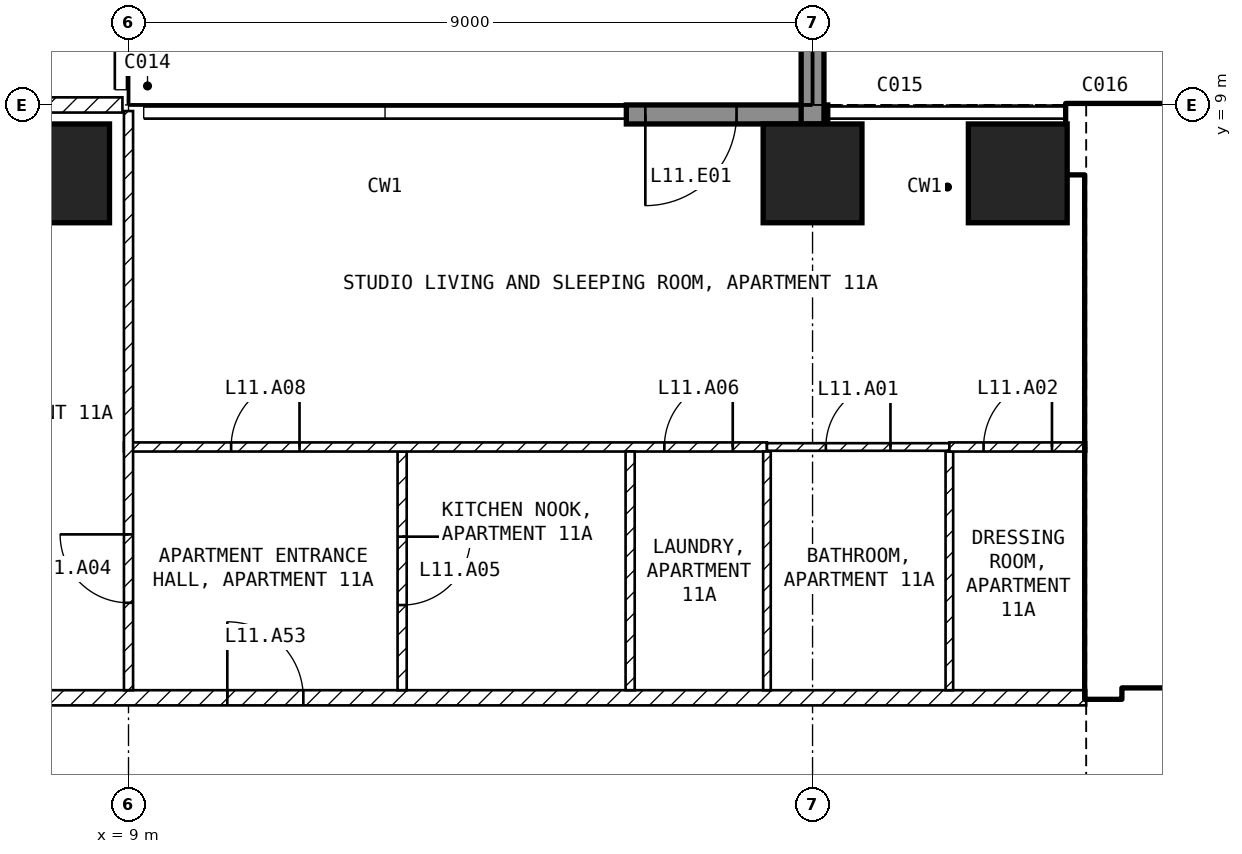
"""IFC4 building model, lengths in metres.
Left out: names, types, materials, properties, quantities, classifications, styles, units other than length and angle.
Written with IfcOpenShell. Run it as: python <this file> out.ifc"""

import sys

from ifc_helpers import new_model, si_unit, direction, frame, frame_2d, origin, origin_2d, place, context, subcontext, project, spatial, rectangle, extrude, element, fill, save


model = new_model("IFC4")
c1 = context("Model", 3, precision=1e-05, world=origin(), true_north=direction((0.0, 1.0)))
c2 = subcontext(c1, "Body", "Model", "MODEL_VIEW")
j1 = project(units=[si_unit("LENGTHUNIT", "METRE"), si_unit("PLANEANGLEUNIT", "RADIAN")], contexts=[c1])
p1 = place(None, origin())
s1 = spatial("IfcSite", under=j1, at=p1, CompositionType="ELEMENT")
p2 = place(p1, origin())
s2 = spatial("IfcBuilding", under=s1, at=p2, CompositionType="ELEMENT")
p3 = place(p2, frame((0.0, 0.0, 57.5)))
s3 = spatial("IfcBuildingStorey", under=s2, at=p3, CompositionType="ELEMENT", Elevation=57.5)
for number, where, z_axis, x_axis in (
    (1, (8.1, 8.1, -0.25), (0.0, 0.0, 1.0), (1.0, 0.0, 0.0)),
    (2, (18.0, 8.1, -0.25), (0.0, 0.0, 1.0), (1.0, 0.0, 0.0)),
    (3, (20.7, 8.1, -0.25), (0.0, 0.0, 1.0), (1.0, 0.0, 0.0)),
):
    element("IfcColumn", number, at=place(p3, frame(where, z_axis=z_axis, x_axis=x_axis)), inside=s3, PredefinedType="COLUMN", context=c2, shape_type="SweptSolid", body=[
        extrude(rectangle(XDim=1.3, YDim=1.3, at=origin_2d()), origin(), (0.0, 0.0, 1.0), 3.5),
    ])
p4 = place(p3, frame((18.2, 8.875, 0.0), z_axis=(0.0, 0.0, 1.0), x_axis=(-1.0, 0.0, 0.0)))
e4 = element("IfcWall", 4, at=p4, inside=s3, PredefinedType="SOLIDWALL", context=c2, shape_type="SweptSolid", body=[
    extrude(rectangle(XDim=2.65, YDim=0.25, at=frame_2d((1.325, 0.0))), origin(), (0.0, 0.0, 1.0), 3.25),
])
p5 = place(p4, frame((1.2, 0.0, 0.0)))
e5 = element("IfcOpeningElement", 5, at=p5, cuts=e4, PredefinedType="OPENING", context=c2, shape_type="SweptSolid", body=[
    extrude(rectangle(XDim=1.2, YDim=2.4, at=frame_2d((0.6, 1.2))), frame((0.0, 0.135, 0.0), z_axis=(0.0, -1.0, 0.0), x_axis=(1.0, 0.0, 0.0)), (0.0, 0.0, 1.0), 0.27),
])
p6 = place(p3, frame((18.0, 8.75, 0.0), z_axis=(0.0, 0.0, 1.0), x_axis=(0.0, 1.0, 0.0)))
e6 = element("IfcWall", 6, at=p6, inside=s3, PredefinedType="SOLIDWALL", context=c2, shape_type="SweptSolid", body=[
    extrude(rectangle(XDim=2.95, YDim=0.3, at=frame_2d((1.475, 0.0))), origin(), (0.0, 0.0, 1.0), 3.25),
])
p7 = place(p3, frame((21.35, 8.55, 0.0), z_axis=(0.0, 0.0, 1.0), x_axis=(1.0, 0.0, 0.0)))
e7 = element("IfcWall", 7, at=p7, inside=s3, PredefinedType="SHEAR", context=c2, shape_type="SweptSolid", body=[
    extrude(rectangle(XDim=10.15, YDim=0.9, at=frame_2d((5.075, 0.0))), origin(), (0.0, 0.0, 1.0), 3.25),
])
p8 = place(p3, frame((21.825, 1.2, 0.0), z_axis=(0.0, 0.0, 1.0), x_axis=(0.0, 1.0, 0.0)))
e8 = element("IfcWall", 8, at=p8, inside=s3, PredefinedType="SHEAR", context=c2, shape_type="SweptSolid", body=[
    extrude(rectangle(XDim=6.9, YDim=0.45, at=frame_2d((3.45, 0.0))), origin(), (0.0, 0.0, 1.0), 3.25),
])
p9 = place(p3, frame((22.05, 1.45, 0.0), z_axis=(0.0, 0.0, 1.0), x_axis=(1.0, 0.0, 0.0)))
e9 = element("IfcWall", 9, at=p9, inside=s3, PredefinedType="SOLIDWALL", context=c2, shape_type="SweptSolid", body=[
    extrude(rectangle(XDim=13.05, YDim=0.2, at=frame_2d((6.525, 0.0))), origin(), (0.0, 0.0, 1.0), 3.25),
])
p10 = place(p9, frame((0.75, 0.0, 0.0)))
e10 = element("IfcOpeningElement", 10, at=p10, cuts=e9, PredefinedType="OPENING", context=c2, shape_type="SweptSolid", body=[
    extrude(rectangle(XDim=1.0, YDim=2.1, at=frame_2d((0.5, 1.05))), frame((0.0, 0.11, 0.0), z_axis=(0.0, -1.0, 0.0), x_axis=(1.0, 0.0, 0.0)), (0.0, 0.0, 1.0), 0.22),
])
p11 = place(p9, frame((3.25, 0.0, 0.0)))
e11 = element("IfcOpeningElement", 11, at=p11, cuts=e9, PredefinedType="OPENING", context=c2, shape_type="SweptSolid", body=[
    extrude(rectangle(XDim=1.0, YDim=2.1, at=frame_2d((0.5, 1.05))), frame((0.0, 0.11, 0.0), z_axis=(0.0, -1.0, 0.0), x_axis=(1.0, 0.0, 0.0)), (0.0, 0.0, 1.0), 0.22),
])
p12 = place(p3, frame((22.05, 5.15, 0.0), z_axis=(0.0, 0.0, 1.0), x_axis=(1.0, 0.0, 0.0)))
e12 = element("IfcWall", 12, at=p12, inside=s3, PredefinedType="SOLIDWALL", context=c2, shape_type="SweptSolid", body=[
    extrude(rectangle(XDim=6.3, YDim=0.2, at=frame_2d((3.15, 0.0))), origin(), (0.0, 0.0, 1.0), 3.25),
])
p13 = place(p12, frame((0.2, 0.0, 0.0)))
e13 = element("IfcOpeningElement", 13, at=p13, cuts=e12, PredefinedType="OPENING", context=c2, shape_type="SweptSolid", body=[
    extrude(rectangle(XDim=1.0, YDim=2.1, at=frame_2d((0.5, 1.05))), frame((0.0, 0.11, 0.0), z_axis=(0.0, -1.0, 0.0), x_axis=(1.0, 0.0, 0.0)), (0.0, 0.0, 1.0), 0.22),
])
p14 = place(p3, frame((1.1, 1.2, 0.0), z_axis=(0.0, 0.0, 1.0), x_axis=(1.0, 0.0, 0.0)))
e14 = element("IfcWall", 14, at=p14, inside=s3, PredefinedType="PARTITIONING", context=c2, shape_type="SweptSolid", body=[
    extrude(rectangle(XDim=20.5, YDim=0.2, at=frame_2d((10.25, 0.0))), origin(), (0.0, 0.0, 1.0), 3.25),
])
p15 = place(p14, frame((9.2, 0.0, 0.0)))
e15 = element("IfcOpeningElement", 15, at=p15, cuts=e14, PredefinedType="OPENING", context=c2, shape_type="SweptSolid", body=[
    extrude(rectangle(XDim=1.0, YDim=2.1, at=frame_2d((0.5, 1.05))), frame((0.0, 0.11, 0.0), z_axis=(0.0, -1.0, 0.0), x_axis=(1.0, 0.0, 0.0)), (0.0, 0.0, 1.0), 0.22),
])
p16 = place(p3, frame((-8.92, 9.0, 0.0), z_axis=(0.0, 0.0, 1.0), x_axis=(1.0, 0.0, 0.0)))
e16 = element("IfcWall", 16, at=p16, inside=s3, PredefinedType="PARTITIONING", context=c2, shape_type="SweptSolid", body=[
    extrude(rectangle(XDim=17.84, YDim=0.2, at=frame_2d((8.92, 0.0))), origin(), (0.0, 0.0, 1.0), 3.25),
])
p17 = place(p16, frame((8.42, 0.0, 0.0)))
e17 = element("IfcOpeningElement", 17, at=p17, cuts=e16, PredefinedType="OPENING", context=c2, shape_type="SweptSolid", body=[
    extrude(rectangle(XDim=1.0, YDim=2.1, at=frame_2d((0.5, 1.05))), frame((0.0, 0.11, 0.0), z_axis=(0.0, -1.0, 0.0), x_axis=(1.0, 0.0, 0.0)), (0.0, 0.0, 1.0), 0.22),
])
p18 = place(p3, frame((12.6, 4.44, 0.0), z_axis=(0.0, 0.0, 1.0), x_axis=(0.0, -1.0, 0.0)))
e18 = element("IfcWall", 18, at=p18, inside=s3, PredefinedType="PARTITIONING", context=c2, shape_type="SweptSolid", body=[
    extrude(rectangle(XDim=3.14, YDim=0.12, at=frame_2d((1.57, 0.0))), origin(), (0.0, 0.0, 1.0), 3.25),
])
p19 = place(p18, frame((1.12, 0.0, 0.0)))
e19 = element("IfcOpeningElement", 19, at=p19, cuts=e18, PredefinedType="OPENING", context=c2, shape_type="SweptSolid", body=[
    extrude(rectangle(XDim=0.9, YDim=2.1, at=frame_2d((0.45, 1.05))), frame((0.0, 0.07, 0.0), z_axis=(0.0, -1.0, 0.0), x_axis=(1.0, 0.0, 0.0)), (0.0, 0.0, 1.0), 0.14),
])
p20 = place(p3, frame((8.94, 4.5, 0.0), z_axis=(0.0, 0.0, 1.0), x_axis=(1.0, 0.0, 0.0)))
e20 = element("IfcWall", 20, at=p20, inside=s3, PredefinedType="PARTITIONING", context=c2, shape_type="SweptSolid", body=[
    extrude(rectangle(XDim=8.46, YDim=0.12, at=frame_2d((4.23, 0.0))), origin(), (0.0, 0.0, 1.0), 3.25),
])
p21 = place(p20, frame((7.11, 0.0, 0.0)))
e21 = element("IfcOpeningElement", 21, at=p21, cuts=e20, PredefinedType="OPENING", context=c2, shape_type="SweptSolid", body=[
    extrude(rectangle(XDim=0.9, YDim=2.1, at=frame_2d((0.45, 1.05))), frame((0.0, 0.07, 0.0), z_axis=(0.0, -1.0, 0.0), x_axis=(1.0, 0.0, 0.0)), (0.0, 0.0, 1.0), 0.14),
])
p22 = place(p20, frame((1.41, 0.0, 0.0)))
e22 = element("IfcOpeningElement", 22, at=p22, cuts=e20, PredefinedType="OPENING", context=c2, shape_type="SweptSolid", body=[
    extrude(rectangle(XDim=0.9, YDim=2.1, at=frame_2d((0.45, 1.05))), frame((0.0, 0.07, 0.0), z_axis=(0.0, -1.0, 0.0), x_axis=(1.0, 0.0, 0.0)), (0.0, 0.0, 1.0), 0.14),
])
p23 = place(p3, frame((9.0, 1.3, 0.0), z_axis=(0.0, 0.0, 1.0), x_axis=(0.0, 1.0, 0.0)))
e23 = element("IfcWall", 23, at=p23, inside=s3, PredefinedType="PARTITIONING", context=c2, shape_type="SweptSolid", body=[
    extrude(rectangle(XDim=7.62, YDim=0.12, at=frame_2d((3.81, 0.0))), origin(), (0.0, 0.0, 1.0), 3.25),
])
p24 = place(p23, frame((1.15, 0.0, 0.0)))
e24 = element("IfcOpeningElement", 24, at=p24, cuts=e23, PredefinedType="OPENING", context=c2, shape_type="SweptSolid", body=[
    extrude(rectangle(XDim=0.9, YDim=2.1, at=frame_2d((0.45, 1.05))), frame((0.0, 0.07, 0.0), z_axis=(0.0, -1.0, 0.0), x_axis=(1.0, 0.0, 0.0)), (0.0, 0.0, 1.0), 0.14),
])
p25 = place(p3, frame((15.6, 4.44, 0.0), z_axis=(0.0, 0.0, 1.0), x_axis=(0.0, -1.0, 0.0)))
e25 = element("IfcWall", 25, at=p25, inside=s3, PredefinedType="PARTITIONING", context=c2, shape_type="SweptSolid", body=[
    extrude(rectangle(XDim=3.14, YDim=0.12, at=frame_2d((1.57, 0.0))), origin(), (0.0, 0.0, 1.0), 3.25),
])
for number, where, z_axis, x_axis in (
    (26, (17.4, 4.44, 0.0), (0.0, 0.0, 1.0), (0.0, -1.0, 0.0)),
    (27, (19.8, 4.44, 0.0), (0.0, 0.0, 1.0), (0.0, -1.0, 0.0)),
):
    element("IfcWall", number, at=place(p3, frame(where, z_axis=z_axis, x_axis=x_axis)), inside=s3, PredefinedType="PARTITIONING", context=c2, shape_type="SweptSolid", body=[
        extrude(rectangle(XDim=3.14, YDim=0.1, at=frame_2d((1.57, 0.0))), origin(), (0.0, 0.0, 1.0), 3.25),
    ])
p26 = place(p3, frame((17.4, 4.5, 0.0), z_axis=(0.0, 0.0, 1.0), x_axis=(1.0, 0.0, 0.0)))
e28 = element("IfcWall", 28, at=p26, inside=s3, PredefinedType="PARTITIONING", context=c2, shape_type="SweptSolid", body=[
    extrude(rectangle(XDim=2.4, YDim=0.1, at=frame_2d((1.2, 0.0))), origin(), (0.0, 0.0, 1.0), 3.25),
])
p27 = place(p26, frame((0.775, 0.0, 0.0)))
e29 = element("IfcOpeningElement", 29, at=p27, cuts=e28, PredefinedType="OPENING", context=c2, shape_type="SweptSolid", body=[
    extrude(rectangle(XDim=0.85, YDim=2.1, at=frame_2d((0.425, 1.05))), frame((0.0, 0.06, 0.0), z_axis=(0.0, -1.0, 0.0), x_axis=(1.0, 0.0, 0.0)), (0.0, 0.0, 1.0), 0.12),
])
p28 = place(p3, frame((19.8, 4.5, 0.0), z_axis=(0.0, 0.0, 1.0), x_axis=(1.0, 0.0, 0.0)))
e30 = element("IfcWall", 30, at=p28, inside=s3, PredefinedType="PARTITIONING", context=c2, shape_type="SweptSolid", body=[
    extrude(rectangle(XDim=1.8, YDim=0.12, at=frame_2d((0.9, 0.0))), origin(), (0.0, 0.0, 1.0), 3.25),
])
p29 = place(p28, frame((0.45, 0.0, 0.0)))
e31 = element("IfcOpeningElement", 31, at=p29, cuts=e30, PredefinedType="OPENING", context=c2, shape_type="SweptSolid", body=[
    extrude(rectangle(XDim=0.9, YDim=2.1, at=frame_2d((0.45, 1.05))), frame((0.0, 0.07, 0.0), z_axis=(0.0, -1.0, 0.0), x_axis=(1.0, 0.0, 0.0)), (0.0, 0.0, 1.0), 0.14),
])
p30 = place(p5, origin())
e32 = element("IfcDoor", 32, at=p30, inside=s3, OperationType="SINGLE_SWING_RIGHT", PredefinedType="DOOR", context=c2, shape_type="SweptSolid", body=[
    extrude(rectangle(XDim=1.2, YDim=2.4, at=frame_2d((0.6, 1.2))), frame((0.0, 0.025, 0.0), z_axis=(0.0, -1.0, 0.0), x_axis=(1.0, 0.0, 0.0)), (0.0, 0.0, 1.0), 0.05),
])
fill(e5, e32)
p31 = place(p13, origin())
e33 = element("IfcDoor", 33, at=p31, inside=s3, OperationType="SINGLE_SWING_LEFT", PredefinedType="DOOR", context=c2, shape_type="SweptSolid", body=[
    extrude(rectangle(XDim=1.0, YDim=2.1, at=frame_2d((0.5, 1.05))), frame((0.0, 0.025, 0.0), z_axis=(0.0, -1.0, 0.0), x_axis=(1.0, 0.0, 0.0)), (0.0, 0.0, 1.0), 0.05),
])
fill(e13, e33)
p32 = place(p27, origin())
e34 = element("IfcDoor", 34, at=p32, inside=s3, OperationType="SINGLE_SWING_RIGHT", PredefinedType="DOOR", context=c2, shape_type="SweptSolid", body=[
    extrude(rectangle(XDim=0.85, YDim=2.1, at=frame_2d((0.425, 1.05))), frame((0.0, 0.025, 0.0), z_axis=(0.0, -1.0, 0.0), x_axis=(1.0, 0.0, 0.0)), (0.0, 0.0, 1.0), 0.05),
])
fill(e29, e34)
p33 = place(p29, origin())
e35 = element("IfcDoor", 35, at=p33, inside=s3, OperationType="SINGLE_SWING_RIGHT", PredefinedType="DOOR", context=c2, shape_type="SweptSolid", body=[
    extrude(rectangle(XDim=0.9, YDim=2.1, at=frame_2d((0.45, 1.05))), frame((0.0, 0.025, 0.0), z_axis=(0.0, -1.0, 0.0), x_axis=(1.0, 0.0, 0.0)), (0.0, 0.0, 1.0), 0.05),
])
fill(e31, e35)
p34 = place(p24, origin())
e36 = element("IfcDoor", 36, at=p34, inside=s3, OperationType="SINGLE_SWING_RIGHT", PredefinedType="DOOR", context=c2, shape_type="SweptSolid", body=[
    extrude(rectangle(XDim=0.9, YDim=2.1, at=frame_2d((0.45, 1.05))), frame((0.0, 0.025, 0.0), z_axis=(0.0, -1.0, 0.0), x_axis=(1.0, 0.0, 0.0)), (0.0, 0.0, 1.0), 0.05),
])
fill(e24, e36)
p35 = place(p19, origin())
e37 = element("IfcDoor", 37, at=p35, inside=s3, OperationType="SINGLE_SWING_LEFT", PredefinedType="DOOR", context=c2, shape_type="SweptSolid", body=[
    extrude(rectangle(XDim=0.9, YDim=2.1, at=frame_2d((0.45, 1.05))), frame((0.0, 0.025, 0.0), z_axis=(0.0, -1.0, 0.0), x_axis=(1.0, 0.0, 0.0)), (0.0, 0.0, 1.0), 0.05),
])
fill(e19, e37)
p36 = place(p21, origin())
e38 = element("IfcDoor", 38, at=p36, inside=s3, OperationType="SINGLE_SWING_RIGHT", PredefinedType="DOOR", context=c2, shape_type="SweptSolid", body=[
    extrude(rectangle(XDim=0.9, YDim=2.1, at=frame_2d((0.45, 1.05))), frame((0.0, 0.025, 0.0), z_axis=(0.0, -1.0, 0.0), x_axis=(1.0, 0.0, 0.0)), (0.0, 0.0, 1.0), 0.05),
])
fill(e21, e38)
p37 = place(p22, origin())
e39 = element("IfcDoor", 39, at=p37, inside=s3, OperationType="SINGLE_SWING_RIGHT", PredefinedType="DOOR", context=c2, shape_type="SweptSolid", body=[
    extrude(rectangle(XDim=0.9, YDim=2.1, at=frame_2d((0.45, 1.05))), frame((0.0, 0.025, 0.0), z_axis=(0.0, -1.0, 0.0), x_axis=(1.0, 0.0, 0.0)), (0.0, 0.0, 1.0), 0.05),
])
fill(e22, e39)
p38 = place(p15, origin())
e40 = element("IfcDoor", 40, at=p38, inside=s3, OperationType="SINGLE_SWING_LEFT", PredefinedType="DOOR", context=c2, shape_type="SweptSolid", body=[
    extrude(rectangle(XDim=1.0, YDim=2.1, at=frame_2d((0.5, 1.05))), frame((0.0, 0.025, 0.0), z_axis=(0.0, -1.0, 0.0), x_axis=(1.0, 0.0, 0.0)), (0.0, 0.0, 1.0), 0.05),
])
fill(e15, e40)
save(model, sys.argv[1])
